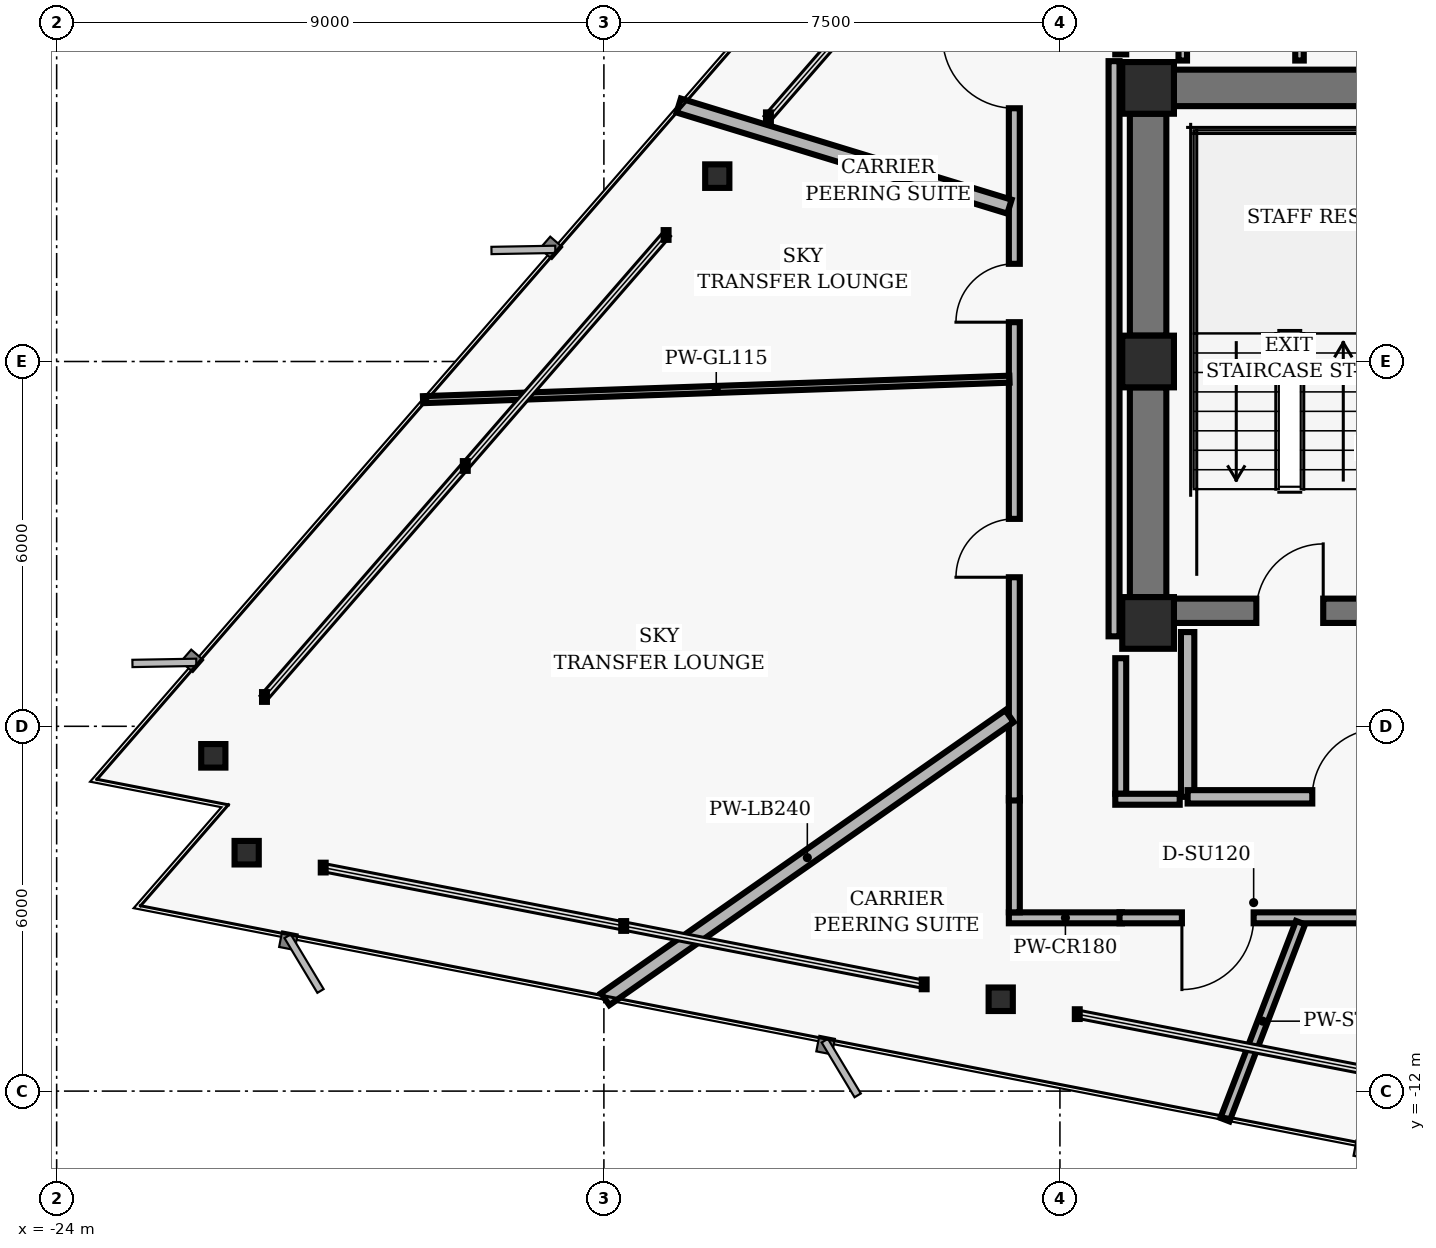
"""IFC4 building model, lengths in metres.
Left out: names, types, materials, properties, quantities, classifications, styles, units other than length and angle.
Written with IfcOpenShell. Run it as: python <this file> out.ifc"""

import sys

from ifc_helpers import new_model, si_unit, direction, frame, frame_2d, origin, origin_2d, place, context, subcontext, project, spatial, rectangle, hollow_rectangle, i_section, extrude, element, fill, save


model = new_model("IFC4")
c1 = context("Model", 3, precision=1e-05, world=origin(), true_north=direction((0.0, 1.0)))
c2 = subcontext(c1, "Body", "Model", "MODEL_VIEW")
j1 = project(units=[si_unit("LENGTHUNIT", "METRE"), si_unit("PLANEANGLEUNIT", "RADIAN")], contexts=[c1])
p1 = place(None, origin())
s1 = spatial("IfcSite", under=j1, at=p1, CompositionType="ELEMENT")
p2 = place(p1, origin())
s2 = spatial("IfcBuilding", under=s1, at=p2, CompositionType="ELEMENT")
p3 = place(p2, frame((0.0, 0.0, 168.48)))
s3 = spatial("IfcBuildingStorey", under=s2, at=p3, CompositionType="ELEMENT", Elevation=168.48)
for number, where, z_axis, x_axis in (
    (1, (-6.05, 4.5, 0.0), (0.0, 0.0, 1.0), (1.0, 0.0, 0.0)),
    (2, (-6.05, 0.0, 0.0), (0.0, 0.0, 1.0), (1.0, 0.0, 0.0)),
    (3, (-6.05, -4.3, 0.0), (0.0, 0.0, 1.0), (1.0, 0.0, 0.0)),
):
    element("IfcColumn", number, at=place(p3, frame(where, z_axis=z_axis, x_axis=x_axis)), inside=s3, PredefinedType="COLUMN", context=c2, shape_type="SweptSolid", body=[
        extrude(hollow_rectangle(XDim=0.85, YDim=0.85, WallThickness=0.055, InnerFilletRadius=0.02, OuterFilletRadius=0.04, at=origin_2d()), origin(), (0.0, 0.0, 1.0), 3.04),
    ])
p4 = place(p3, frame((-6.05, 0.425, 0.0), z_axis=(0.0, 0.0, 1.0), x_axis=(0.0, 1.0, 0.0)))
e4 = element("IfcWall", 4, at=p4, inside=s3, PredefinedType="SHEAR", context=c2, shape_type="SweptSolid", body=[
    extrude(rectangle(XDim=3.65, YDim=0.6, at=frame_2d((1.825, 0.0))), origin(), (0.0, 0.0, 1.0), 2.718),
])
p5 = place(p3, frame((-6.05, -3.875, 0.0), z_axis=(0.0, 0.0, 1.0), x_axis=(0.0, 1.0, 0.0)))
e5 = element("IfcWall", 5, at=p5, inside=s3, PredefinedType="SHEAR", context=c2, shape_type="SweptSolid", body=[
    extrude(rectangle(XDim=3.45, YDim=0.6, at=frame_2d((1.725, 0.0))), origin(), (0.0, 0.0, 1.0), 2.718),
])
p6 = place(p3, frame((-5.625, -4.1, 0.0), z_axis=(0.0, 0.0, 1.0), x_axis=(1.0, 0.0, 0.0)))
e6 = element("IfcWall", 6, at=p6, inside=s3, PredefinedType="SHEAR", context=c2, shape_type="SweptSolid", body=[
    extrude(rectangle(XDim=11.25, YDim=0.4, at=frame_2d((5.625, 0.0))), origin(), (0.0, 0.0, 1.0), 2.718),
])
p7 = place(p6, frame((1.355, 0.0, 0.0)))
e7 = element("IfcOpeningElement", 7, at=p7, cuts=e6, PredefinedType="OPENING", context=c2, shape_type="SweptSolid", body=[
    extrude(rectangle(XDim=1.1, YDim=2.04, at=frame_2d((0.55, 1.02))), frame((0.0, 0.21, 0.0), z_axis=(0.0, -1.0, 0.0), x_axis=(1.0, 0.0, 0.0)), (0.0, 0.0, 1.0), 0.42),
])
p8 = place(p6, frame((8.795, 0.0, 0.0)))
e8 = element("IfcOpeningElement", 8, at=p8, cuts=e6, PredefinedType="OPENING", context=c2, shape_type="SweptSolid", body=[
    extrude(rectangle(XDim=1.1, YDim=2.04, at=frame_2d((0.55, 1.02))), frame((0.0, 0.21, 0.0), z_axis=(0.0, -1.0, 0.0), x_axis=(1.0, 0.0, 0.0)), (0.0, 0.0, 1.0), 0.42),
])
p9 = place(p6, frame((4.095, 0.0, 0.0)))
e9 = element("IfcOpeningElement", 9, at=p9, cuts=e6, PredefinedType="OPENING", context=c2, shape_type="SweptSolid", body=[
    extrude(rectangle(XDim=1.06, YDim=2.04, at=frame_2d((0.53, 1.02))), frame((0.0, 0.21, 0.0), z_axis=(0.0, -1.0, 0.0), x_axis=(1.0, 0.0, 0.0)), (0.0, 0.0, 1.0), 0.42),
])
p10 = place(p6, frame((6.095, 0.0, 0.0)))
e10 = element("IfcOpeningElement", 10, at=p10, cuts=e6, PredefinedType="OPENING", context=c2, shape_type="SweptSolid", body=[
    extrude(rectangle(XDim=1.06, YDim=2.04, at=frame_2d((0.53, 1.02))), frame((0.0, 0.21, 0.0), z_axis=(0.0, -1.0, 0.0), x_axis=(1.0, 0.0, 0.0)), (0.0, 0.0, 1.0), 0.42),
])
p11 = place(p3, frame((-5.625, 4.5, 0.0), z_axis=(0.0, 0.0, 1.0), x_axis=(1.0, 0.0, 0.0)))
e11 = element("IfcWall", 11, at=p11, inside=s3, PredefinedType="SHEAR", context=c2, shape_type="SweptSolid", body=[
    extrude(rectangle(XDim=3.575, YDim=0.6, at=frame_2d((1.788, 0.0))), origin(), (0.0, 0.0, 1.0), 2.718),
])
for number, where, z_axis, x_axis in (
    (12, (-13.135, 3.049, 0.0), (0.0, 0.0, 1.0), (1.0, 0.0, 0.0)),
    (13, (-21.424, -6.486, 0.0), (0.0, 0.0, 1.0), (1.0, 0.0, 0.0)),
    (14, (-20.875, -8.079, 0.0), (0.0, 0.0, 1.0), (1.0, 0.0, 0.0)),
    (15, (-8.474, -10.49, 0.0), (0.0, 0.0, 1.0), (1.0, 0.0, 0.0)),
):
    element("IfcColumn", number, at=place(p3, frame(where, z_axis=z_axis, x_axis=x_axis)), inside=s3, PredefinedType="COLUMN", context=c2, shape_type="SweptSolid", body=[
        extrude(i_section(OverallWidth=0.398, OverallDepth=0.387, WebThickness=0.021, FlangeThickness=0.033, FilletRadius=0.018, at=origin_2d()), origin(), (0.0, 0.0, 1.0), 3.04),
    ])
p12 = place(p3, frame((-5.4, -7.16, 0.0), z_axis=(0.0, 0.0, 1.0), x_axis=(0.0, 1.0, 0.0)))
e16 = element("IfcWall", 16, at=p12, inside=s3, PredefinedType="PARTITIONING", context=c2, shape_type="SweptSolid", body=[
    extrude(rectangle(XDim=2.71, YDim=0.22, at=frame_2d((1.355, 0.0))), origin(), (0.0, 0.0, 1.0), 2.693),
])
p13 = place(p3, frame((-5.4, -7.16, 0.0), z_axis=(0.0, 0.0, 1.0), x_axis=(1.0, 0.0, 0.0)))
e17 = element("IfcWall", 17, at=p13, inside=s3, PredefinedType="PARTITIONING", context=c2, shape_type="SweptSolid", body=[
    extrude(rectangle(XDim=5.4, YDim=0.22, at=frame_2d((2.7, 0.0))), origin(), (0.0, 0.0, 1.0), 2.26),
])
p14 = place(p13, frame((2.05, 0.0, 0.0)))
e18 = element("IfcOpeningElement", 18, at=p14, cuts=e17, PredefinedType="OPENING", context=c2, shape_type="SweptSolid", body=[
    extrude(rectangle(XDim=1.12, YDim=2.02, at=frame_2d((0.56, 1.01))), frame((0.0, 0.12, 0.0), z_axis=(0.0, -1.0, 0.0), x_axis=(1.0, 0.0, 0.0)), (0.0, 0.0, 1.0), 0.24),
])
for number, where, z_axis, x_axis in (
    (19, (-5.48, 4.95, 0.0), (0.0, 0.0, 1.0), (0.0, 1.0, 0.0)),
    (20, (-3.56, 4.95, 0.0), (0.0, 0.0, 1.0), (0.0, 1.0, 0.0)),
):
    element("IfcWall", number, at=place(p3, frame(where, z_axis=z_axis, x_axis=x_axis)), inside=s3, PredefinedType="PARTITIONING", context=c2, shape_type="SweptSolid", body=[
        extrude(rectangle(XDim=2.1, YDim=0.14, at=frame_2d((1.05, 0.0))), origin(), (0.0, 0.0, 1.0), 2.693),
    ])
p15 = place(p3, frame((-6.48, -9.15, 0.0), z_axis=(0.0, 0.0, 1.0), x_axis=(-1.0, 0.0, 0.0)))
e21 = element("IfcWall", 21, at=p15, inside=s3, PredefinedType="PARTITIONING", context=c2, shape_type="SweptSolid", body=[
    extrude(rectangle(XDim=1.86, YDim=0.18, at=frame_2d((0.93, 0.0))), origin(), (0.0, 0.0, 1.0), 2.26),
])
p16 = place(p3, frame((-8.25, -9.06, 0.0), z_axis=(0.0, 0.0, 1.0), x_axis=(0.0, 1.0, 0.0)))
e22 = element("IfcWall", 22, at=p16, inside=s3, PredefinedType="PARTITIONING", context=c2, shape_type="SweptSolid", body=[
    extrude(rectangle(XDim=1.88, YDim=0.18, at=frame_2d((0.94, 0.0))), origin(), (0.0, 0.0, 1.0), 2.693),
])
p17 = place(p3, frame((-8.25, -7.22, 0.0), z_axis=(0.0, 0.0, 1.0), x_axis=(0.0, 1.0, 0.0)))
e23 = element("IfcWall", 23, at=p17, inside=s3, PredefinedType="PARTITIONING", context=c2, shape_type="SweptSolid", body=[
    extrude(rectangle(XDim=14.44, YDim=0.18, at=frame_2d((7.22, 0.0))), origin(), (0.0, 0.0, 1.0), 2.693),
])
p18 = place(p17, frame((3.671, 0.0, 0.0)))
e24 = element("IfcOpeningElement", 24, at=p18, cuts=e23, PredefinedType="OPENING", context=c2, shape_type="SweptSolid", body=[
    extrude(rectangle(XDim=0.96, YDim=2.02, at=frame_2d((0.48, 1.01))), frame((0.0, 0.1, 0.0), z_axis=(0.0, -1.0, 0.0), x_axis=(1.0, 0.0, 0.0)), (0.0, 0.0, 1.0), 0.2),
])
p19 = place(p17, frame((11.385, 0.0, 0.0)))
e25 = element("IfcOpeningElement", 25, at=p19, cuts=e23, PredefinedType="OPENING", context=c2, shape_type="SweptSolid", body=[
    extrude(rectangle(XDim=1.18, YDim=2.02, at=frame_2d((0.59, 1.01))), frame((0.0, 0.1, 0.0), z_axis=(0.0, -1.0, 0.0), x_axis=(1.0, 0.0, 0.0)), (0.0, 0.0, 1.0), 0.2),
])
p20 = place(p17, frame((7.867, 0.0, 0.0)))
e26 = element("IfcOpeningElement", 26, at=p20, cuts=e23, PredefinedType="OPENING", context=c2, shape_type="SweptSolid", body=[
    extrude(rectangle(XDim=0.96, YDim=2.02, at=frame_2d((0.48, 1.01))), frame((0.0, 0.1, 0.0), z_axis=(0.0, -1.0, 0.0), x_axis=(1.0, 0.0, 0.0)), (0.0, 0.0, 1.0), 0.2),
])
p21 = place(p3, frame((-6.5, 7.11, 0.0), z_axis=(0.0, 0.0, 1.0), x_axis=(0.0, -1.0, 0.0)))
e27 = element("IfcWall", 27, at=p21, inside=s3, PredefinedType="PARTITIONING", context=c2, shape_type="SweptSolid", body=[
    extrude(rectangle(XDim=2.058, YDim=0.18, at=frame_2d((1.029, 0.0))), origin(), (0.0, 0.0, 1.0), 2.693),
])
p22 = place(p3, frame((-6.61, 4.94, 0.0), z_axis=(0.0, 0.0, 1.0), x_axis=(0.0, -1.0, 0.0)))
e28 = element("IfcWall", 28, at=p22, inside=s3, PredefinedType="PARTITIONING", context=c2, shape_type="SweptSolid", body=[
    extrude(rectangle(XDim=9.46, YDim=0.18, at=frame_2d((4.73, 0.0))), origin(), (0.0, 0.0, 1.0), 2.693),
])
p23 = place(p3, frame((-6.5, -4.88, 0.0), z_axis=(0.0, 0.0, 1.0), x_axis=(0.0, -1.0, 0.0)))
e29 = element("IfcWall", 29, at=p23, inside=s3, PredefinedType="PARTITIONING", context=c2, shape_type="SweptSolid", body=[
    extrude(rectangle(XDim=2.23, YDim=0.18, at=frame_2d((1.115, 0.0))), origin(), (0.0, 0.0, 1.0), 2.693),
])
p24 = place(p3, frame((-6.59, -7.2, 0.0), z_axis=(0.0, 0.0, 1.0), x_axis=(1.0, 0.0, 0.0)))
e30 = element("IfcWall", 30, at=p24, inside=s3, PredefinedType="PARTITIONING", context=c2, shape_type="SweptSolid", body=[
    extrude(rectangle(XDim=1.06, YDim=0.18, at=frame_2d((0.53, 0.0))), origin(), (0.0, 0.0, 1.0), 2.693),
])
p25 = place(p3, frame((10.98, -9.15, 0.0), z_axis=(0.0, 0.0, 1.0), x_axis=(-1.0, 0.0, 0.0)))
e31 = element("IfcWall", 31, at=p25, inside=s3, PredefinedType="PARTITIONING", context=c2, shape_type="SweptSolid", body=[
    extrude(rectangle(XDim=17.5, YDim=0.18, at=frame_2d((8.75, 0.0))), origin(), (0.0, 0.0, 1.0), 2.26),
])
p26 = place(p25, frame((15.294, 0.0, 0.0)))
e32 = element("IfcOpeningElement", 32, at=p26, cuts=e31, PredefinedType="OPENING", context=c2, shape_type="SweptSolid", body=[
    extrude(rectangle(XDim=1.18, YDim=2.02, at=frame_2d((0.59, 1.01))), frame((0.0, 0.1, 0.0), z_axis=(0.0, -1.0, 0.0), x_axis=(1.0, 0.0, 0.0)), (0.0, 0.0, 1.0), 0.2),
])
p27 = place(p25, frame((11.206, 0.0, 0.0)))
e33 = element("IfcOpeningElement", 33, at=p27, cuts=e31, PredefinedType="OPENING", context=c2, shape_type="SweptSolid", body=[
    extrude(rectangle(XDim=0.96, YDim=2.02, at=frame_2d((0.48, 1.01))), frame((0.0, 0.1, 0.0), z_axis=(0.0, -1.0, 0.0), x_axis=(1.0, 0.0, 0.0)), (0.0, 0.0, 1.0), 0.2),
])
p28 = place(p25, frame((4.43, 0.0, 0.0)))
e34 = element("IfcOpeningElement", 34, at=p28, cuts=e31, PredefinedType="OPENING", context=c2, shape_type="SweptSolid", body=[
    extrude(rectangle(XDim=1.02, YDim=2.02, at=frame_2d((0.51, 1.01))), frame((0.0, 0.1, 0.0), z_axis=(0.0, -1.0, 0.0), x_axis=(1.0, 0.0, 0.0)), (0.0, 0.0, 1.0), 0.2),
])
p29 = place(p3, frame((-8.33, -0.291, 0.0), z_axis=(0.0, 0.0, 1.0), x_axis=(-0.99939124622, -0.03488749028, 0.0)))
e35 = element("IfcWall", 35, at=p29, inside=s3, PredefinedType="MOVABLE", context=c2, shape_type="SweptSolid", body=[
    extrude(rectangle(XDim=9.65, YDim=0.115, at=frame_2d((4.825, 0.0))), origin(), (0.0, 0.0, 1.0), 2.693),
])
p30 = place(p3, frame((-8.33, -5.833, 0.0), z_axis=(0.0, 0.0, 1.0), x_axis=(-0.819148537799, -0.573581444105, 0.0)))
e36 = element("IfcWall", 36, at=p30, inside=s3, PredefinedType="PARTITIONING", context=c2, shape_type="SweptSolid", body=[
    extrude(rectangle(XDim=8.116, YDim=0.24, at=frame_2d((4.058, 0.0))), origin(), (0.0, 0.0, 1.0), 2.693),
])
p31 = place(p3, frame((-3.543, -9.23, 0.0), z_axis=(0.0, 0.0, 1.0), x_axis=(-0.358337785815, -0.933592004709, 0.0)))
e37 = element("IfcWall", 37, at=p31, inside=s3, PredefinedType="PARTITIONING", context=c2, shape_type="SweptSolid", body=[
    extrude(rectangle(XDim=3.47, YDim=0.16, at=frame_2d((1.735, 0.0))), origin(), (0.0, 0.0, 1.0), 2.693),
])
p32 = place(p3, frame((-8.33, 2.547, 0.0), z_axis=(0.0, 0.0, 1.0), x_axis=(-0.95629724105, 0.292396283766, 0.0)))
e38 = element("IfcWall", 38, at=p32, inside=s3, PredefinedType="PARTITIONING", context=c2, shape_type="SweptSolid", body=[
    extrude(rectangle(XDim=5.688, YDim=0.24, at=frame_2d((2.844, 0.0))), origin(), (0.0, 0.0, 1.0), 2.693),
])
p33 = place(p7, origin())
e39 = element("IfcDoor", 39, at=p33, inside=s3, OperationType="SINGLE_SWING_RIGHT", PredefinedType="DOOR", context=c2, shape_type="SweptSolid", body=[
    extrude(rectangle(XDim=1.1, YDim=2.04, at=frame_2d((0.55, 1.02))), frame((0.0, 0.025, 0.0), z_axis=(0.0, -1.0, 0.0), x_axis=(1.0, 0.0, 0.0)), (0.0, 0.0, 1.0), 0.05),
])
fill(e7, e39)
p34 = place(p14, origin())
e40 = element("IfcDoor", 40, at=p34, inside=s3, OperationType="SINGLE_SWING_RIGHT", PredefinedType="DOOR", context=c2, shape_type="SweptSolid", body=[
    extrude(rectangle(XDim=1.12, YDim=2.02, at=frame_2d((0.56, 1.01))), frame((0.0, 0.025, 0.0), z_axis=(0.0, -1.0, 0.0), x_axis=(1.0, 0.0, 0.0)), (0.0, 0.0, 1.0), 0.05),
])
fill(e18, e40)
p35 = place(p18, origin())
e41 = element("IfcDoor", 41, at=p35, inside=s3, OperationType="SINGLE_SWING_LEFT", PredefinedType="DOOR", context=c2, shape_type="SweptSolid", body=[
    extrude(rectangle(XDim=0.96, YDim=2.02, at=frame_2d((0.48, 1.01))), frame((0.0, 0.025, 0.0), z_axis=(0.0, -1.0, 0.0), x_axis=(1.0, 0.0, 0.0)), (0.0, 0.0, 1.0), 0.05),
])
fill(e24, e41)
p36 = place(p26, origin())
e42 = element("IfcDoor", 42, at=p36, inside=s3, OperationType="SINGLE_SWING_RIGHT", PredefinedType="DOOR", context=c2, shape_type="SweptSolid", body=[
    extrude(rectangle(XDim=1.18, YDim=2.02, at=frame_2d((0.59, 1.01))), frame((0.0, 0.025, 0.0), z_axis=(0.0, -1.0, 0.0), x_axis=(1.0, 0.0, 0.0)), (0.0, 0.0, 1.0), 0.05),
])
fill(e32, e42)
p37 = place(p19, origin())
e43 = element("IfcDoor", 43, at=p37, inside=s3, OperationType="SINGLE_SWING_RIGHT", PredefinedType="DOOR", context=c2, shape_type="SweptSolid", body=[
    extrude(rectangle(XDim=1.18, YDim=2.02, at=frame_2d((0.59, 1.01))), frame((0.0, 0.025, 0.0), z_axis=(0.0, -1.0, 0.0), x_axis=(1.0, 0.0, 0.0)), (0.0, 0.0, 1.0), 0.05),
])
fill(e25, e43)
p38 = place(p20, origin())
e44 = element("IfcDoor", 44, at=p38, inside=s3, OperationType="SINGLE_SWING_LEFT", PredefinedType="DOOR", context=c2, shape_type="SweptSolid", body=[
    extrude(rectangle(XDim=0.96, YDim=2.02, at=frame_2d((0.48, 1.01))), frame((0.0, 0.025, 0.0), z_axis=(0.0, -1.0, 0.0), x_axis=(1.0, 0.0, 0.0)), (0.0, 0.0, 1.0), 0.05),
])
fill(e26, e44)
save(model, sys.argv[1])
